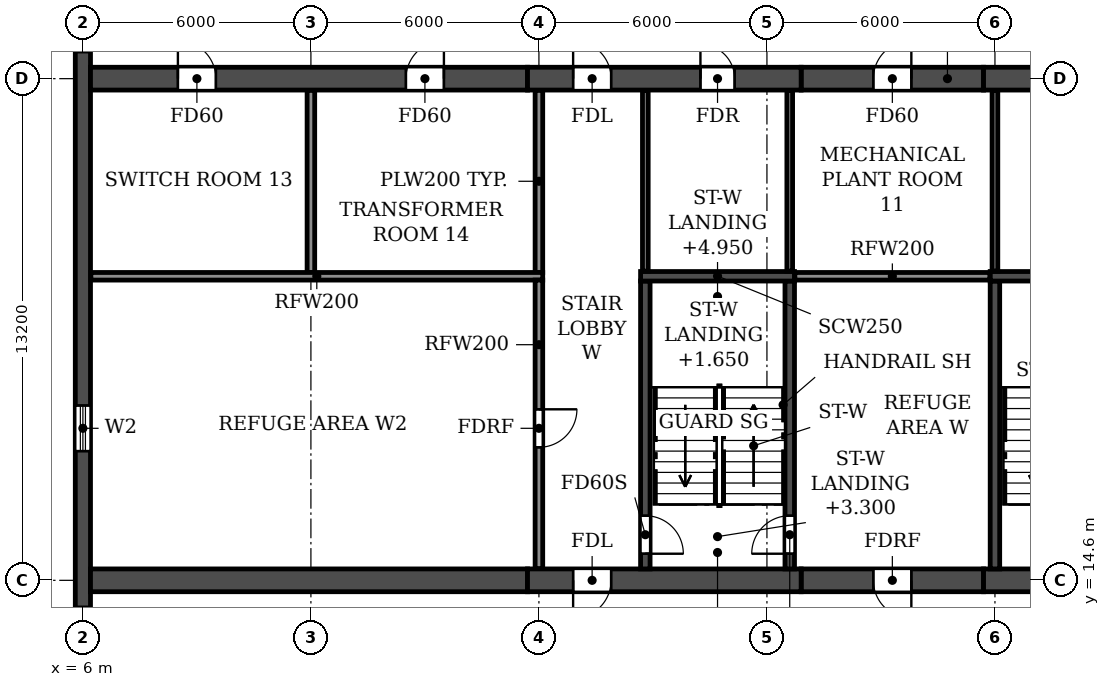
"""IFC4 building model, lengths in metres.
Left out: names, types, materials, properties, quantities, classifications, styles, units other than length and angle.
Written with IfcOpenShell. Run it as: python <this file> out.ifc"""

import sys

from ifc_helpers import new_model, si_unit, direction, frame, frame_2d, origin, place, context, subcontext, project, spatial, rectangle, extrude, element, fill, save


model = new_model("IFC4")
c1 = context("Model", 3, precision=1e-05, world=origin(), true_north=direction((0.0, 1.0)))
c2 = subcontext(c1, "Body", "Model", "MODEL_VIEW")
j1 = project(units=[si_unit("LENGTHUNIT", "METRE"), si_unit("PLANEANGLEUNIT", "RADIAN")], contexts=[c1])
p1 = place(None, origin())
s1 = spatial("IfcSite", under=j1, at=p1, CompositionType="ELEMENT")
p2 = place(p1, origin())
s2 = spatial("IfcBuilding", under=s1, at=p2, CompositionType="ELEMENT")
p3 = place(p2, frame((0.0, 0.0, 66.3)))
s3 = spatial("IfcBuildingStorey", under=s2, at=p3, CompositionType="ELEMENT", Elevation=66.3)
p4 = place(p3, frame((6.0, 4.683, 0.0), z_axis=(0.0, 0.0, 1.0), x_axis=(0.0, 1.0, 0.0)))
e1 = element("IfcWall", 1, at=p4, inside=s3, PredefinedType="SHEAR", context=c2, shape_type="SweptSolid", body=[
    extrude(rectangle(XDim=35.434, YDim=0.4, at=frame_2d((17.717, 0.0))), origin(), (0.0, 0.0, 1.0), 6.36),
])
p5 = place(p4, frame((23.817, 0.0, 0.9)))
e2 = element("IfcOpeningElement", 2, at=p5, cuts=e1, PredefinedType="OPENING", context=c2, shape_type="SweptSolid", body=[
    extrude(rectangle(XDim=1.2, YDim=1.5, at=frame_2d((0.6, 0.75))), frame((0.0, 0.21, 0.0), z_axis=(0.0, -1.0, 0.0), x_axis=(1.0, 0.0, 0.0)), (0.0, 0.0, 1.0), 0.42),
])
p6 = place(p4, frame((8.017, 0.0, 0.9)))
e3 = element("IfcOpeningElement", 3, at=p6, cuts=e1, PredefinedType="OPENING", context=c2, shape_type="SweptSolid", body=[
    extrude(rectangle(XDim=1.2, YDim=1.5, at=frame_2d((0.6, 0.75))), frame((0.0, 0.21, 0.0), z_axis=(0.0, -1.0, 0.0), x_axis=(1.0, 0.0, 0.0)), (0.0, 0.0, 1.0), 0.42),
])
p7 = place(p4, frame((13.317, 0.0, 0.9)))
e4 = element("IfcOpeningElement", 4, at=p7, cuts=e1, PredefinedType="OPENING", context=c2, shape_type="SweptSolid", body=[
    extrude(rectangle(XDim=1.2, YDim=1.5, at=frame_2d((0.6, 0.75))), frame((0.0, 0.21, 0.0), z_axis=(0.0, -1.0, 0.0), x_axis=(1.0, 0.0, 0.0)), (0.0, 0.0, 1.0), 0.42),
])
p8 = place(p3, frame((6.2, 14.6, 0.0), z_axis=(0.0, 0.0, 1.0), x_axis=(1.0, 0.0, 0.0)))
e5 = element("IfcWall", 5, at=p8, inside=s3, PredefinedType="SHEAR", context=c2, shape_type="SweptSolid", body=[
    extrude(rectangle(XDim=11.5, YDim=0.6, at=frame_2d((5.75, 0.0))), origin(), (0.0, 0.0, 1.0), 6.36),
])
p9 = place(p3, frame((24.9, 14.6, 0.0), z_axis=(0.0, 0.0, 1.0), x_axis=(1.0, 0.0, 0.0)))
e6 = element("IfcWall", 6, at=p9, inside=s3, PredefinedType="SHEAR", context=c2, shape_type="SweptSolid", body=[
    extrude(rectangle(XDim=4.8, YDim=0.6, at=frame_2d((2.4, 0.0))), origin(), (0.0, 0.0, 1.0), 6.36),
])
p10 = place(p9, frame((1.9, 0.0, 0.0)))
e7 = element("IfcOpeningElement", 7, at=p10, cuts=e6, PredefinedType="OPENING", context=c2, shape_type="SweptSolid", body=[
    extrude(rectangle(XDim=1.0, YDim=2.1, at=frame_2d((0.5, 1.05))), frame((0.0, 0.31, 0.0), z_axis=(0.0, -1.0, 0.0), x_axis=(1.0, 0.0, 0.0)), (0.0, 0.0, 1.0), 0.62),
])
p11 = place(p3, frame((6.2, 27.8, 0.0), z_axis=(0.0, 0.0, 1.0), x_axis=(1.0, 0.0, 0.0)))
e8 = element("IfcWall", 8, at=p11, inside=s3, PredefinedType="SHEAR", context=c2, shape_type="SweptSolid", body=[
    extrude(rectangle(XDim=11.5, YDim=0.6, at=frame_2d((5.75, 0.0))), origin(), (0.0, 0.0, 1.0), 6.36),
])
p12 = place(p11, frame((2.3, 0.0, 0.0)))
e9 = element("IfcOpeningElement", 9, at=p12, cuts=e8, PredefinedType="OPENING", context=c2, shape_type="SweptSolid", body=[
    extrude(rectangle(XDim=1.0, YDim=2.1, at=frame_2d((0.5, 1.05))), frame((0.0, 0.31, 0.0), z_axis=(0.0, -1.0, 0.0), x_axis=(1.0, 0.0, 0.0)), (0.0, 0.0, 1.0), 0.62),
])
p13 = place(p11, frame((8.3, 0.0, 0.0)))
e10 = element("IfcOpeningElement", 10, at=p13, cuts=e8, PredefinedType="OPENING", context=c2, shape_type="SweptSolid", body=[
    extrude(rectangle(XDim=1.0, YDim=2.1, at=frame_2d((0.5, 1.05))), frame((0.0, 0.31, 0.0), z_axis=(0.0, -1.0, 0.0), x_axis=(1.0, 0.0, 0.0)), (0.0, 0.0, 1.0), 0.62),
])
p14 = place(p3, frame((24.9, 27.8, 0.0), z_axis=(0.0, 0.0, 1.0), x_axis=(1.0, 0.0, 0.0)))
e11 = element("IfcWall", 11, at=p14, inside=s3, PredefinedType="SHEAR", context=c2, shape_type="SweptSolid", body=[
    extrude(rectangle(XDim=4.8, YDim=0.6, at=frame_2d((2.4, 0.0))), origin(), (0.0, 0.0, 1.0), 6.36),
])
p15 = place(p14, frame((1.9, 0.0, 0.0)))
e12 = element("IfcOpeningElement", 12, at=p15, cuts=e11, PredefinedType="OPENING", context=c2, shape_type="SweptSolid", body=[
    extrude(rectangle(XDim=1.0, YDim=2.1, at=frame_2d((0.5, 1.05))), frame((0.0, 0.31, 0.0), z_axis=(0.0, -1.0, 0.0), x_axis=(1.0, 0.0, 0.0)), (0.0, 0.0, 1.0), 0.62),
])
p16 = place(p3, frame((17.7, 14.6, 0.0), z_axis=(0.0, 0.0, 1.0), x_axis=(1.0, 0.0, 0.0)))
e13 = element("IfcWall", 13, at=p16, inside=s3, PredefinedType="SOLIDWALL", context=c2, shape_type="SweptSolid", body=[
    extrude(rectangle(XDim=7.2, YDim=0.6, at=frame_2d((3.6, 0.0))), origin(), (0.0, 0.0, 1.0), 6.36),
])
p17 = place(p16, frame((1.2, 0.0, 0.0)))
e14 = element("IfcOpeningElement", 14, at=p17, cuts=e13, PredefinedType="OPENING", context=c2, shape_type="SweptSolid", body=[
    extrude(rectangle(XDim=1.0, YDim=2.1, at=frame_2d((0.5, 1.05))), frame((0.0, 0.31, 0.0), z_axis=(0.0, -1.0, 0.0), x_axis=(1.0, 0.0, 0.0)), (0.0, 0.0, 1.0), 0.62),
])
p18 = place(p3, frame((29.7, 14.6, 0.0), z_axis=(0.0, 0.0, 1.0), x_axis=(1.0, 0.0, 0.0)))
e15 = element("IfcWall", 15, at=p18, inside=s3, PredefinedType="SOLIDWALL", context=c2, shape_type="SweptSolid", body=[
    extrude(rectangle(XDim=42.6, YDim=0.6, at=frame_2d((21.3, 0.0))), origin(), (0.0, 0.0, 1.0), 6.36),
])
p19 = place(p18, frame((1.7, 0.0, 0.0)))
e16 = element("IfcOpeningElement", 16, at=p19, cuts=e15, PredefinedType="OPENING", context=c2, shape_type="SweptSolid", body=[
    extrude(rectangle(XDim=1.0, YDim=2.1, at=frame_2d((0.5, 1.05))), frame((0.0, 0.31, 0.0), z_axis=(0.0, -1.0, 0.0), x_axis=(1.0, 0.0, 0.0)), (0.0, 0.0, 1.0), 0.62),
])
p20 = place(p18, frame((13.0, 0.0, 0.0)))
e17 = element("IfcOpeningElement", 17, at=p20, cuts=e15, PredefinedType="OPENING", context=c2, shape_type="SweptSolid", body=[
    extrude(rectangle(XDim=1.0, YDim=2.1, at=frame_2d((0.5, 1.05))), frame((0.0, 0.31, 0.0), z_axis=(0.0, -1.0, 0.0), x_axis=(1.0, 0.0, 0.0)), (0.0, 0.0, 1.0), 0.62),
])
p21 = place(p18, frame((16.9, 0.0, 0.0)))
e18 = element("IfcOpeningElement", 18, at=p21, cuts=e15, PredefinedType="OPENING", context=c2, shape_type="SweptSolid", body=[
    extrude(rectangle(XDim=1.0, YDim=2.1, at=frame_2d((0.5, 1.05))), frame((0.0, 0.31, 0.0), z_axis=(0.0, -1.0, 0.0), x_axis=(1.0, 0.0, 0.0)), (0.0, 0.0, 1.0), 0.62),
])
p22 = place(p18, frame((20.8, 0.0, 0.0)))
e19 = element("IfcOpeningElement", 19, at=p22, cuts=e15, PredefinedType="OPENING", context=c2, shape_type="SweptSolid", body=[
    extrude(rectangle(XDim=1.0, YDim=2.1, at=frame_2d((0.5, 1.05))), frame((0.0, 0.31, 0.0), z_axis=(0.0, -1.0, 0.0), x_axis=(1.0, 0.0, 0.0)), (0.0, 0.0, 1.0), 0.62),
])
p23 = place(p18, frame((23.4, 0.0, 0.0)))
e20 = element("IfcOpeningElement", 20, at=p23, cuts=e15, PredefinedType="OPENING", context=c2, shape_type="SweptSolid", body=[
    extrude(rectangle(XDim=1.0, YDim=2.1, at=frame_2d((0.5, 1.05))), frame((0.0, 0.31, 0.0), z_axis=(0.0, -1.0, 0.0), x_axis=(1.0, 0.0, 0.0)), (0.0, 0.0, 1.0), 0.62),
])
p24 = place(p18, frame((27.3, 0.0, 0.0)))
e21 = element("IfcOpeningElement", 21, at=p24, cuts=e15, PredefinedType="OPENING", context=c2, shape_type="SweptSolid", body=[
    extrude(rectangle(XDim=1.0, YDim=2.1, at=frame_2d((0.5, 1.05))), frame((0.0, 0.31, 0.0), z_axis=(0.0, -1.0, 0.0), x_axis=(1.0, 0.0, 0.0)), (0.0, 0.0, 1.0), 0.62),
])
p25 = place(p18, frame((39.9, 0.0, 0.0)))
e22 = element("IfcOpeningElement", 22, at=p25, cuts=e15, PredefinedType="OPENING", context=c2, shape_type="SweptSolid", body=[
    extrude(rectangle(XDim=1.0, YDim=2.1, at=frame_2d((0.5, 1.05))), frame((0.0, 0.31, 0.0), z_axis=(0.0, -1.0, 0.0), x_axis=(1.0, 0.0, 0.0)), (0.0, 0.0, 1.0), 0.62),
])
p26 = place(p3, frame((17.7, 27.8, 0.0), z_axis=(0.0, 0.0, 1.0), x_axis=(1.0, 0.0, 0.0)))
e23 = element("IfcWall", 23, at=p26, inside=s3, PredefinedType="SOLIDWALL", context=c2, shape_type="SweptSolid", body=[
    extrude(rectangle(XDim=7.2, YDim=0.6, at=frame_2d((3.6, 0.0))), origin(), (0.0, 0.0, 1.0), 6.36),
])
p27 = place(p26, frame((1.2, 0.0, 0.0)))
e24 = element("IfcOpeningElement", 24, at=p27, cuts=e23, PredefinedType="OPENING", context=c2, shape_type="SweptSolid", body=[
    extrude(rectangle(XDim=1.0, YDim=2.1, at=frame_2d((0.5, 1.05))), frame((0.0, 0.31, 0.0), z_axis=(0.0, -1.0, 0.0), x_axis=(1.0, 0.0, 0.0)), (0.0, 0.0, 1.0), 0.62),
])
p28 = place(p26, frame((4.55, 0.0, 0.0)))
e25 = element("IfcOpeningElement", 25, at=p28, cuts=e23, PredefinedType="OPENING", context=c2, shape_type="SweptSolid", body=[
    extrude(rectangle(XDim=0.9, YDim=2.1, at=frame_2d((0.45, 1.05))), frame((0.0, 0.31, 0.0), z_axis=(0.0, -1.0, 0.0), x_axis=(1.0, 0.0, 0.0)), (0.0, 0.0, 1.0), 0.62),
])
p29 = place(p3, frame((29.7, 27.8, 0.0), z_axis=(0.0, 0.0, 1.0), x_axis=(1.0, 0.0, 0.0)))
e26 = element("IfcWall", 26, at=p29, inside=s3, PredefinedType="SOLIDWALL", context=c2, shape_type="SweptSolid", body=[
    extrude(rectangle(XDim=42.6, YDim=0.6, at=frame_2d((21.3, 0.0))), origin(), (0.0, 0.0, 1.0), 6.36),
])
p30 = place(p29, frame((1.75, 0.0, 0.0)))
e27 = element("IfcOpeningElement", 27, at=p30, cuts=e26, PredefinedType="OPENING", context=c2, shape_type="SweptSolid", body=[
    extrude(rectangle(XDim=0.9, YDim=2.1, at=frame_2d((0.45, 1.05))), frame((0.0, 0.31, 0.0), z_axis=(0.0, -1.0, 0.0), x_axis=(1.0, 0.0, 0.0)), (0.0, 0.0, 1.0), 0.62),
])
p31 = place(p29, frame((7.25, 0.0, 0.0)))
e28 = element("IfcOpeningElement", 28, at=p31, cuts=e26, PredefinedType="OPENING", context=c2, shape_type="SweptSolid", body=[
    extrude(rectangle(XDim=1.5, YDim=2.1, at=frame_2d((0.75, 1.05))), frame((0.0, 0.31, 0.0), z_axis=(0.0, -1.0, 0.0), x_axis=(1.0, 0.0, 0.0)), (0.0, 0.0, 1.0), 0.62),
])
p32 = place(p29, frame((12.7, 0.0, 0.0)))
e29 = element("IfcOpeningElement", 29, at=p32, cuts=e26, PredefinedType="OPENING", context=c2, shape_type="SweptSolid", body=[
    extrude(rectangle(XDim=1.0, YDim=2.1, at=frame_2d((0.5, 1.05))), frame((0.0, 0.31, 0.0), z_axis=(0.0, -1.0, 0.0), x_axis=(1.0, 0.0, 0.0)), (0.0, 0.0, 1.0), 0.62),
])
p33 = place(p29, frame((17.9, 0.0, 0.0)))
e30 = element("IfcOpeningElement", 30, at=p33, cuts=e26, PredefinedType="OPENING", context=c2, shape_type="SweptSolid", body=[
    extrude(rectangle(XDim=1.0, YDim=2.1, at=frame_2d((0.5, 1.05))), frame((0.0, 0.31, 0.0), z_axis=(0.0, -1.0, 0.0), x_axis=(1.0, 0.0, 0.0)), (0.0, 0.0, 1.0), 0.62),
])
p34 = place(p29, frame((20.8, 0.0, 0.0)))
e31 = element("IfcOpeningElement", 31, at=p34, cuts=e26, PredefinedType="OPENING", context=c2, shape_type="SweptSolid", body=[
    extrude(rectangle(XDim=1.0, YDim=2.1, at=frame_2d((0.5, 1.05))), frame((0.0, 0.31, 0.0), z_axis=(0.0, -1.0, 0.0), x_axis=(1.0, 0.0, 0.0)), (0.0, 0.0, 1.0), 0.62),
])
p35 = place(p29, frame((26.3, 0.0, 0.0)))
e32 = element("IfcOpeningElement", 32, at=p35, cuts=e26, PredefinedType="OPENING", context=c2, shape_type="SweptSolid", body=[
    extrude(rectangle(XDim=1.0, YDim=2.1, at=frame_2d((0.5, 1.05))), frame((0.0, 0.31, 0.0), z_axis=(0.0, -1.0, 0.0), x_axis=(1.0, 0.0, 0.0)), (0.0, 0.0, 1.0), 0.62),
])
p36 = place(p29, frame((31.5, 0.0, 0.0)))
e33 = element("IfcOpeningElement", 33, at=p36, cuts=e26, PredefinedType="OPENING", context=c2, shape_type="SweptSolid", body=[
    extrude(rectangle(XDim=1.0, YDim=2.1, at=frame_2d((0.5, 1.05))), frame((0.0, 0.31, 0.0), z_axis=(0.0, -1.0, 0.0), x_axis=(1.0, 0.0, 0.0)), (0.0, 0.0, 1.0), 0.62),
])
p37 = place(p29, frame((35.4, 0.0, 0.0)))
e34 = element("IfcOpeningElement", 34, at=p37, cuts=e26, PredefinedType="OPENING", context=c2, shape_type="SweptSolid", body=[
    extrude(rectangle(XDim=1.0, YDim=2.1, at=frame_2d((0.5, 1.05))), frame((0.0, 0.31, 0.0), z_axis=(0.0, -1.0, 0.0), x_axis=(1.0, 0.0, 0.0)), (0.0, 0.0, 1.0), 0.62),
])
p38 = place(p29, frame((39.95, 0.0, 0.0)))
e35 = element("IfcOpeningElement", 35, at=p38, cuts=e26, PredefinedType="OPENING", context=c2, shape_type="SweptSolid", body=[
    extrude(rectangle(XDim=0.9, YDim=2.1, at=frame_2d((0.45, 1.05))), frame((0.0, 0.31, 0.0), z_axis=(0.0, -1.0, 0.0), x_axis=(1.0, 0.0, 0.0)), (0.0, 0.0, 1.0), 0.62),
])
p39 = place(p3, frame((30.0, 14.9, 0.0), z_axis=(0.0, 0.0, 1.0), x_axis=(0.0, 1.0, 0.0)))
e36 = element("IfcWall", 36, at=p39, inside=s3, PredefinedType="SOLIDWALL", context=c2, shape_type="SweptSolid", body=[
    extrude(rectangle(XDim=7.575, YDim=0.25, at=frame_2d((3.788, 0.0))), origin(), (0.0, 0.0, 1.0), 6.36),
])
p40 = place(p3, frame((29.875, 22.6, 0.0), z_axis=(0.0, 0.0, 1.0), x_axis=(1.0, 0.0, 0.0)))
e37 = element("IfcWall", 37, at=p40, inside=s3, PredefinedType="SOLIDWALL", context=c2, shape_type="SweptSolid", body=[
    extrude(rectangle(XDim=4.05, YDim=0.25, at=frame_2d((2.025, 0.0))), origin(), (0.0, 0.0, 1.0), 6.36),
])
p41 = place(p3, frame((20.8, 14.9, 0.0), z_axis=(0.0, 0.0, 1.0), x_axis=(0.0, 1.0, 0.0)))
e38 = element("IfcWall", 38, at=p41, inside=s3, PredefinedType="SOLIDWALL", context=c2, shape_type="SweptSolid", body=[
    extrude(rectangle(XDim=7.575, YDim=0.25, at=frame_2d((3.788, 0.0))), origin(), (0.0, 0.0, 1.0), 6.36),
])
p42 = place(p41, frame((0.4, 0.0, 0.0)))
e39 = element("IfcOpeningElement", 39, at=p42, cuts=e38, PredefinedType="OPENING", context=c2, shape_type="SweptSolid", body=[
    extrude(rectangle(XDim=1.0, YDim=2.1, at=frame_2d((0.5, 1.05))), frame((0.0, 0.135, 0.0), z_axis=(0.0, -1.0, 0.0), x_axis=(1.0, 0.0, 0.0)), (0.0, 0.0, 1.0), 0.27),
])
p43 = place(p3, frame((24.6, 14.9, 0.0), z_axis=(0.0, 0.0, 1.0), x_axis=(0.0, 1.0, 0.0)))
e40 = element("IfcWall", 40, at=p43, inside=s3, PredefinedType="SOLIDWALL", context=c2, shape_type="SweptSolid", body=[
    extrude(rectangle(XDim=7.575, YDim=0.25, at=frame_2d((3.788, 0.0))), origin(), (0.0, 0.0, 1.0), 6.36),
])
p44 = place(p43, frame((0.4, 0.0, 0.0)))
e41 = element("IfcOpeningElement", 41, at=p44, cuts=e40, PredefinedType="OPENING", context=c2, shape_type="SweptSolid", body=[
    extrude(rectangle(XDim=1.0, YDim=2.1, at=frame_2d((0.5, 1.05))), frame((0.0, 0.135, 0.0), z_axis=(0.0, -1.0, 0.0), x_axis=(1.0, 0.0, 0.0)), (0.0, 0.0, 1.0), 0.27),
])
p45 = place(p3, frame((20.675, 22.6, 0.0), z_axis=(0.0, 0.0, 1.0), x_axis=(1.0, 0.0, 0.0)))
e42 = element("IfcWall", 42, at=p45, inside=s3, PredefinedType="SOLIDWALL", context=c2, shape_type="SweptSolid", body=[
    extrude(rectangle(XDim=4.05, YDim=0.25, at=frame_2d((2.025, 0.0))), origin(), (0.0, 0.0, 1.0), 6.36),
])
for number, where, z_axis, x_axis in (
    (43, (12.0, 22.7, 0.0), (0.0, 0.0, 1.0), (0.0, 1.0, 0.0)),
    (44, (18.0, 22.7, 0.0), (0.0, 0.0, 1.0), (0.0, 1.0, 0.0)),
):
    element("IfcWall", number, at=place(p3, frame(where, z_axis=z_axis, x_axis=x_axis)), inside=s3, PredefinedType="PARTITIONING", context=c2, shape_type="SweptSolid", body=[
        extrude(rectangle(XDim=4.79, YDim=0.2, at=frame_2d((2.395, 0.0))), origin(), (0.0, 0.0, 1.0), 6.36),
    ])
p46 = place(p3, frame((6.21, 22.6, 0.0), z_axis=(0.0, 0.0, 1.0), x_axis=(1.0, 0.0, 0.0)))
e45 = element("IfcWall", 45, at=p46, inside=s3, PredefinedType="PARTITIONING", context=c2, shape_type="SweptSolid", body=[
    extrude(rectangle(XDim=11.89, YDim=0.2, at=frame_2d((5.945, 0.0))), origin(), (0.0, 0.0, 1.0), 6.36),
])
p47 = place(p3, frame((24.735, 22.6, 0.0), z_axis=(0.0, 0.0, 1.0), x_axis=(1.0, 0.0, 0.0)))
e46 = element("IfcWall", 46, at=p47, inside=s3, PredefinedType="PARTITIONING", context=c2, shape_type="SweptSolid", body=[
    extrude(rectangle(XDim=5.13, YDim=0.2, at=frame_2d((2.565, 0.0))), origin(), (0.0, 0.0, 1.0), 6.36),
])
p48 = place(p3, frame((18.0, 14.91, 0.0), z_axis=(0.0, 0.0, 1.0), x_axis=(0.0, 1.0, 0.0)))
e47 = element("IfcWall", 47, at=p48, inside=s3, PredefinedType="PARTITIONING", context=c2, shape_type="SweptSolid", body=[
    extrude(rectangle(XDim=7.59, YDim=0.2, at=frame_2d((3.795, 0.0))), origin(), (0.0, 0.0, 1.0), 6.36),
])
p49 = place(p48, frame((3.19, 0.0, 0.0)))
e48 = element("IfcOpeningElement", 48, at=p49, cuts=e47, PredefinedType="OPENING", context=c2, shape_type="SweptSolid", body=[
    extrude(rectangle(XDim=1.0, YDim=2.1, at=frame_2d((0.5, 1.05))), frame((0.0, 0.11, 0.0), z_axis=(0.0, -1.0, 0.0), x_axis=(1.0, 0.0, 0.0)), (0.0, 0.0, 1.0), 0.22),
])
for number, where, z_axis, x_axis in (
    (49, (20.8, 22.735, 0.0), (0.0, 0.0, 1.0), (0.0, 1.0, 0.0)),
    (50, (24.6, 22.735, 0.0), (0.0, 0.0, 1.0), (0.0, 1.0, 0.0)),
    (51, (30.0, 22.735, 0.0), (0.0, 0.0, 1.0), (0.0, 1.0, 0.0)),
):
    element("IfcWall", number, at=place(p3, frame(where, z_axis=z_axis, x_axis=x_axis)), inside=s3, PredefinedType="PARTITIONING", context=c2, shape_type="SweptSolid", body=[
        extrude(rectangle(XDim=4.755, YDim=0.15, at=frame_2d((2.377, 0.0))), origin(), (0.0, 0.0, 1.0), 6.36),
    ])
p50 = place(p6, origin())
e52 = element("IfcWindow", 52, at=p50, inside=s3, PartitioningType="SINGLE_PANEL", PredefinedType="WINDOW", context=c2, shape_type="SweptSolid", body=[
    extrude(rectangle(XDim=1.2, YDim=1.5, at=frame_2d((0.6, 0.75))), frame((0.0, 0.03, 0.0), z_axis=(0.0, -1.0, 0.0), x_axis=(1.0, 0.0, 0.0)), (0.0, 0.0, 1.0), 0.06),
])
fill(e3, e52)
p51 = place(p7, origin())
e53 = element("IfcWindow", 53, at=p51, inside=s3, PartitioningType="SINGLE_PANEL", PredefinedType="WINDOW", context=c2, shape_type="SweptSolid", body=[
    extrude(rectangle(XDim=1.2, YDim=1.5, at=frame_2d((0.6, 0.75))), frame((0.0, 0.03, 0.0), z_axis=(0.0, -1.0, 0.0), x_axis=(1.0, 0.0, 0.0)), (0.0, 0.0, 1.0), 0.06),
])
fill(e4, e53)
p52 = place(p12, origin())
e54 = element("IfcDoor", 54, at=p52, inside=s3, OperationType="SINGLE_SWING_LEFT", PredefinedType="DOOR", context=c2, shape_type="SweptSolid", body=[
    extrude(rectangle(XDim=1.0, YDim=2.1, at=frame_2d((0.5, 1.05))), frame((0.0, 0.025, 0.0), z_axis=(0.0, -1.0, 0.0), x_axis=(1.0, 0.0, 0.0)), (0.0, 0.0, 1.0), 0.05),
])
fill(e9, e54)
p53 = place(p13, origin())
e55 = element("IfcDoor", 55, at=p53, inside=s3, OperationType="SINGLE_SWING_RIGHT", PredefinedType="DOOR", context=c2, shape_type="SweptSolid", body=[
    extrude(rectangle(XDim=1.0, YDim=2.1, at=frame_2d((0.5, 1.05))), frame((0.0, 0.025, 0.0), z_axis=(0.0, -1.0, 0.0), x_axis=(1.0, 0.0, 0.0)), (0.0, 0.0, 1.0), 0.05),
])
fill(e10, e55)
p54 = place(p27, origin())
e56 = element("IfcDoor", 56, at=p54, inside=s3, OperationType="SINGLE_SWING_LEFT", PredefinedType="DOOR", context=c2, shape_type="SweptSolid", body=[
    extrude(rectangle(XDim=1.0, YDim=2.1, at=frame_2d((0.5, 1.05))), frame((0.0, 0.025, 0.0), z_axis=(0.0, -1.0, 0.0), x_axis=(1.0, 0.0, 0.0)), (0.0, 0.0, 1.0), 0.05),
])
fill(e24, e56)
p55 = place(p28, origin())
e57 = element("IfcDoor", 57, at=p55, inside=s3, OperationType="SINGLE_SWING_LEFT", PredefinedType="DOOR", context=c2, shape_type="SweptSolid", body=[
    extrude(rectangle(XDim=0.9, YDim=2.1, at=frame_2d((0.45, 1.05))), frame((0.0, 0.025, 0.0), z_axis=(0.0, -1.0, 0.0), x_axis=(1.0, 0.0, 0.0)), (0.0, 0.0, 1.0), 0.05),
])
fill(e25, e57)
p56 = place(p15, origin())
e58 = element("IfcDoor", 58, at=p56, inside=s3, OperationType="SINGLE_SWING_RIGHT", PredefinedType="DOOR", context=c2, shape_type="SweptSolid", body=[
    extrude(rectangle(XDim=1.0, YDim=2.1, at=frame_2d((0.5, 1.05))), frame((0.0, 0.025, 0.0), z_axis=(0.0, -1.0, 0.0), x_axis=(1.0, 0.0, 0.0)), (0.0, 0.0, 1.0), 0.05),
])
fill(e12, e58)
p57 = place(p17, frame((1.0, 0.0, 0.0), z_axis=(0.0, 0.0, 1.0), x_axis=(-1.0, 0.0, 0.0)))
e59 = element("IfcDoor", 59, at=p57, inside=s3, OperationType="SINGLE_SWING_RIGHT", PredefinedType="DOOR", context=c2, shape_type="SweptSolid", body=[
    extrude(rectangle(XDim=1.0, YDim=2.1, at=frame_2d((0.5, 1.05))), frame((0.0, 0.025, 0.0), z_axis=(0.0, -1.0, 0.0), x_axis=(1.0, 0.0, 0.0)), (0.0, 0.0, 1.0), 0.05),
])
fill(e14, e59)
p58 = place(p10, frame((1.0, 0.0, 0.0), z_axis=(0.0, 0.0, 1.0), x_axis=(-1.0, 0.0, 0.0)))
e60 = element("IfcDoor", 60, at=p58, inside=s3, OperationType="SINGLE_SWING_LEFT", PredefinedType="DOOR", context=c2, shape_type="SweptSolid", body=[
    extrude(rectangle(XDim=1.0, YDim=2.1, at=frame_2d((0.5, 1.05))), frame((0.0, 0.025, 0.0), z_axis=(0.0, -1.0, 0.0), x_axis=(1.0, 0.0, 0.0)), (0.0, 0.0, 1.0), 0.05),
])
fill(e7, e60)
p59 = place(p44, origin())
e61 = element("IfcDoor", 61, at=p59, inside=s3, OperationType="SINGLE_SWING_LEFT", PredefinedType="DOOR", context=c2, shape_type="SweptSolid", body=[
    extrude(rectangle(XDim=1.0, YDim=2.1, at=frame_2d((0.5, 1.05))), frame((0.0, 0.025, 0.0), z_axis=(0.0, -1.0, 0.0), x_axis=(1.0, 0.0, 0.0)), (0.0, 0.0, 1.0), 0.05),
])
fill(e41, e61)
p60 = place(p49, frame((1.0, 0.0, 0.0), z_axis=(0.0, 0.0, 1.0), x_axis=(-1.0, 0.0, 0.0)))
e62 = element("IfcDoor", 62, at=p60, inside=s3, OperationType="SINGLE_SWING_LEFT", PredefinedType="DOOR", context=c2, shape_type="SweptSolid", body=[
    extrude(rectangle(XDim=1.0, YDim=2.1, at=frame_2d((0.5, 1.05))), frame((0.0, 0.025, 0.0), z_axis=(0.0, -1.0, 0.0), x_axis=(1.0, 0.0, 0.0)), (0.0, 0.0, 1.0), 0.05),
])
fill(e48, e62)
p61 = place(p42, frame((1.0, 0.0, 0.0), z_axis=(0.0, 0.0, 1.0), x_axis=(-1.0, 0.0, 0.0)))
e63 = element("IfcDoor", 63, at=p61, inside=s3, OperationType="SINGLE_SWING_RIGHT", PredefinedType="DOOR", context=c2, shape_type="SweptSolid", body=[
    extrude(rectangle(XDim=1.0, YDim=2.1, at=frame_2d((0.5, 1.05))), frame((0.0, 0.025, 0.0), z_axis=(0.0, -1.0, 0.0), x_axis=(1.0, 0.0, 0.0)), (0.0, 0.0, 1.0), 0.05),
])
fill(e39, e63)
save(model, sys.argv[1])
